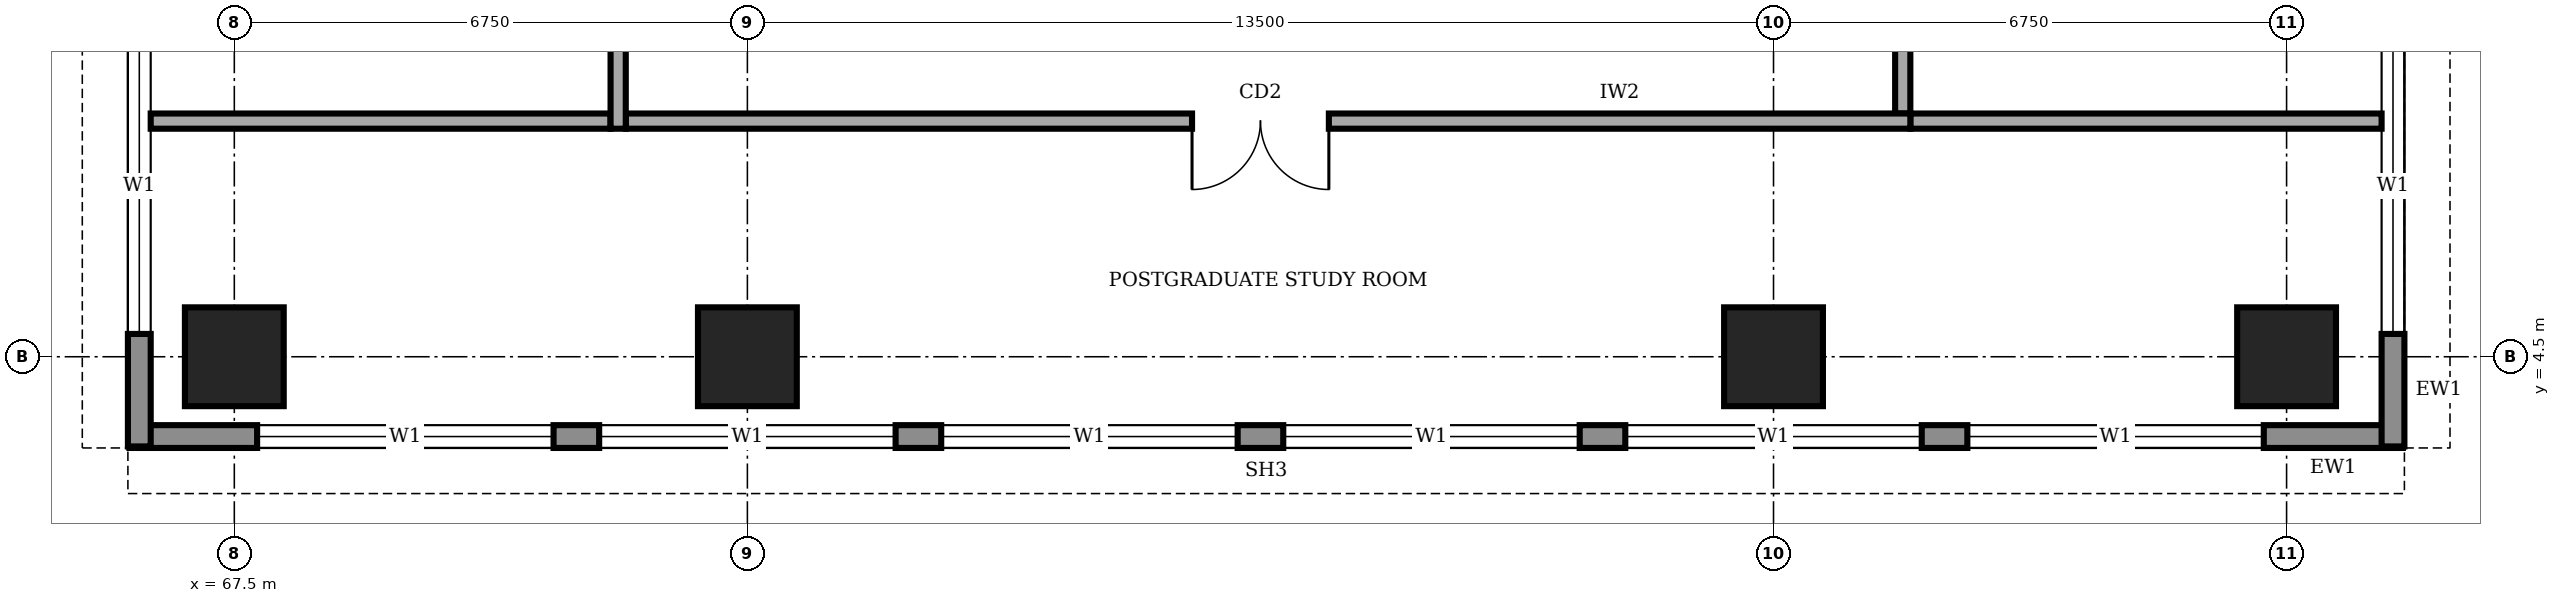
"""IFC4 building model, lengths in metres.
Left out: names, types, materials, properties, quantities, classifications, styles, units other than length and angle.
Written with IfcOpenShell. Run it as: python <this file> out.ifc"""

import sys

from ifc_helpers import new_model, si_unit, direction, frame, frame_2d, origin, origin_2d, place, context, subcontext, project, spatial, rectangle, extrude, element, fill, save


model = new_model("IFC4")
c1 = context("Model", 3, precision=1e-05, world=origin(), true_north=direction((0.0, 1.0)))
c2 = subcontext(c1, "Body", "Model", "MODEL_VIEW")
j1 = project(units=[si_unit("LENGTHUNIT", "METRE"), si_unit("PLANEANGLEUNIT", "RADIAN")], contexts=[c1])
p1 = place(None, origin())
s1 = spatial("IfcSite", under=j1, at=p1, CompositionType="ELEMENT")
p2 = place(p1, origin())
s2 = spatial("IfcBuilding", under=s1, at=p2, CompositionType="ELEMENT")
p3 = place(p2, frame((0.0, 0.0, 209.0)))
s3 = spatial("IfcBuildingStorey", under=s2, at=p3, CompositionType="ELEMENT", Elevation=209.0)
for number, where, z_axis, x_axis in (
    (1, (67.5, 4.5, 0.0), (0.0, 0.0, 1.0), (1.0, 0.0, 0.0)),
    (2, (74.25, 4.5, 0.0), (0.0, 0.0, 1.0), (1.0, 0.0, 0.0)),
    (3, (87.75, 4.5, 0.0), (0.0, 0.0, 1.0), (1.0, 0.0, 0.0)),
    (4, (94.5, 4.5, 0.0), (0.0, 0.0, 1.0), (1.0, 0.0, 0.0)),
):
    element("IfcColumn", number, at=place(p3, frame(where, z_axis=z_axis, x_axis=x_axis)), inside=s3, PredefinedType="COLUMN", context=c2, shape_type="SweptSolid", body=[
        extrude(rectangle(XDim=1.3, YDim=1.3, at=origin_2d()), origin(), (0.0, 0.0, 1.0), 4.0),
    ])
p4 = place(p3, frame((66.12, 3.45, 0.0), z_axis=(0.0, 0.0, 1.0), x_axis=(1.0, 0.0, 0.0)))
e5 = element("IfcWall", 5, at=p4, inside=s3, PredefinedType="STANDARD", context=c2, shape_type="SweptSolid", body=[
    extrude(rectangle(XDim=29.91, YDim=0.3, at=frame_2d((14.955, 0.0))), origin(), (0.0, 0.0, 1.0), 3.75),
])
p5 = place(p4, frame((1.68, 0.0, 0.9)))
e6 = element("IfcOpeningElement", 6, at=p5, cuts=e5, PredefinedType="OPENING", context=c2, shape_type="SweptSolid", body=[
    extrude(rectangle(XDim=3.9, YDim=2.2, at=frame_2d((1.95, 1.1))), frame((0.0, 0.16, 0.0), z_axis=(0.0, -1.0, 0.0), x_axis=(1.0, 0.0, 0.0)), (0.0, 0.0, 1.0), 0.32),
])
p6 = place(p4, frame((6.18, 0.0, 0.9)))
e7 = element("IfcOpeningElement", 7, at=p6, cuts=e5, PredefinedType="OPENING", context=c2, shape_type="SweptSolid", body=[
    extrude(rectangle(XDim=3.9, YDim=2.2, at=frame_2d((1.95, 1.1))), frame((0.0, 0.16, 0.0), z_axis=(0.0, -1.0, 0.0), x_axis=(1.0, 0.0, 0.0)), (0.0, 0.0, 1.0), 0.32),
])
p7 = place(p4, frame((10.68, 0.0, 0.9)))
e8 = element("IfcOpeningElement", 8, at=p7, cuts=e5, PredefinedType="OPENING", context=c2, shape_type="SweptSolid", body=[
    extrude(rectangle(XDim=3.9, YDim=2.2, at=frame_2d((1.95, 1.1))), frame((0.0, 0.16, 0.0), z_axis=(0.0, -1.0, 0.0), x_axis=(1.0, 0.0, 0.0)), (0.0, 0.0, 1.0), 0.32),
])
p8 = place(p4, frame((15.18, 0.0, 0.9)))
e9 = element("IfcOpeningElement", 9, at=p8, cuts=e5, PredefinedType="OPENING", context=c2, shape_type="SweptSolid", body=[
    extrude(rectangle(XDim=3.9, YDim=2.2, at=frame_2d((1.95, 1.1))), frame((0.0, 0.16, 0.0), z_axis=(0.0, -1.0, 0.0), x_axis=(1.0, 0.0, 0.0)), (0.0, 0.0, 1.0), 0.32),
])
p9 = place(p4, frame((19.68, 0.0, 0.9)))
e10 = element("IfcOpeningElement", 10, at=p9, cuts=e5, PredefinedType="OPENING", context=c2, shape_type="SweptSolid", body=[
    extrude(rectangle(XDim=3.9, YDim=2.2, at=frame_2d((1.95, 1.1))), frame((0.0, 0.16, 0.0), z_axis=(0.0, -1.0, 0.0), x_axis=(1.0, 0.0, 0.0)), (0.0, 0.0, 1.0), 0.32),
])
p10 = place(p4, frame((24.18, 0.0, 0.9)))
e11 = element("IfcOpeningElement", 11, at=p10, cuts=e5, PredefinedType="OPENING", context=c2, shape_type="SweptSolid", body=[
    extrude(rectangle(XDim=3.9, YDim=2.2, at=frame_2d((1.95, 1.1))), frame((0.0, 0.16, 0.0), z_axis=(0.0, -1.0, 0.0), x_axis=(1.0, 0.0, 0.0)), (0.0, 0.0, 1.0), 0.32),
])
p11 = place(p3, frame((95.9, 3.32, 0.0), z_axis=(0.0, 0.0, 1.0), x_axis=(0.0, 1.0, 0.0)))
e12 = element("IfcWall", 12, at=p11, inside=s3, PredefinedType="STANDARD", context=c2, shape_type="SweptSolid", body=[
    extrude(rectangle(XDim=33.86, YDim=0.3, at=frame_2d((16.93, 0.0))), origin(), (0.0, 0.0, 1.0), 3.75),
])
p12 = place(p11, frame((1.48, 0.0, 0.9)))
e13 = element("IfcOpeningElement", 13, at=p12, cuts=e12, PredefinedType="OPENING", context=c2, shape_type="SweptSolid", body=[
    extrude(rectangle(XDim=3.9, YDim=2.2, at=frame_2d((1.95, 1.1))), frame((0.0, 0.16, 0.0), z_axis=(0.0, -1.0, 0.0), x_axis=(1.0, 0.0, 0.0)), (0.0, 0.0, 1.0), 0.32),
])
p13 = place(p11, frame((5.98, 0.0, 0.9)))
e14 = element("IfcOpeningElement", 14, at=p13, cuts=e12, PredefinedType="OPENING", context=c2, shape_type="SweptSolid", body=[
    extrude(rectangle(XDim=3.9, YDim=2.2, at=frame_2d((1.95, 1.1))), frame((0.0, 0.16, 0.0), z_axis=(0.0, -1.0, 0.0), x_axis=(1.0, 0.0, 0.0)), (0.0, 0.0, 1.0), 0.32),
])
p14 = place(p11, frame((10.48, 0.0, 0.9)))
e15 = element("IfcOpeningElement", 15, at=p14, cuts=e12, PredefinedType="OPENING", context=c2, shape_type="SweptSolid", body=[
    extrude(rectangle(XDim=3.9, YDim=2.2, at=frame_2d((1.95, 1.1))), frame((0.0, 0.16, 0.0), z_axis=(0.0, -1.0, 0.0), x_axis=(1.0, 0.0, 0.0)), (0.0, 0.0, 1.0), 0.32),
])
p15 = place(p11, frame((14.98, 0.0, 0.9)))
e16 = element("IfcOpeningElement", 16, at=p15, cuts=e12, PredefinedType="OPENING", context=c2, shape_type="SweptSolid", body=[
    extrude(rectangle(XDim=3.9, YDim=2.2, at=frame_2d((1.95, 1.1))), frame((0.0, 0.16, 0.0), z_axis=(0.0, -1.0, 0.0), x_axis=(1.0, 0.0, 0.0)), (0.0, 0.0, 1.0), 0.32),
])
p16 = place(p11, frame((19.48, 0.0, 0.9)))
e17 = element("IfcOpeningElement", 17, at=p16, cuts=e12, PredefinedType="OPENING", context=c2, shape_type="SweptSolid", body=[
    extrude(rectangle(XDim=3.9, YDim=2.2, at=frame_2d((1.95, 1.1))), frame((0.0, 0.16, 0.0), z_axis=(0.0, -1.0, 0.0), x_axis=(1.0, 0.0, 0.0)), (0.0, 0.0, 1.0), 0.32),
])
p17 = place(p11, frame((23.98, 0.0, 0.9)))
e18 = element("IfcOpeningElement", 18, at=p17, cuts=e12, PredefinedType="OPENING", context=c2, shape_type="SweptSolid", body=[
    extrude(rectangle(XDim=3.9, YDim=2.2, at=frame_2d((1.95, 1.1))), frame((0.0, 0.16, 0.0), z_axis=(0.0, -1.0, 0.0), x_axis=(1.0, 0.0, 0.0)), (0.0, 0.0, 1.0), 0.32),
])
p18 = place(p11, frame((28.48, 0.0, 0.9)))
e19 = element("IfcOpeningElement", 19, at=p18, cuts=e12, PredefinedType="OPENING", context=c2, shape_type="SweptSolid", body=[
    extrude(rectangle(XDim=3.9, YDim=2.2, at=frame_2d((1.95, 1.1))), frame((0.0, 0.16, 0.0), z_axis=(0.0, -1.0, 0.0), x_axis=(1.0, 0.0, 0.0)), (0.0, 0.0, 1.0), 0.32),
])
p19 = place(p3, frame((66.25, 37.18, 0.0), z_axis=(0.0, 0.0, 1.0), x_axis=(0.0, -1.0, 0.0)))
e20 = element("IfcWall", 20, at=p19, inside=s3, PredefinedType="STANDARD", context=c2, shape_type="SweptSolid", body=[
    extrude(rectangle(XDim=33.86, YDim=0.3, at=frame_2d((16.93, 0.0))), origin(), (0.0, 0.0, 1.0), 3.75),
])
p20 = place(p19, frame((28.48, 0.0, 0.9)))
e21 = element("IfcOpeningElement", 21, at=p20, cuts=e20, PredefinedType="OPENING", context=c2, shape_type="SweptSolid", body=[
    extrude(rectangle(XDim=3.9, YDim=2.2, at=frame_2d((1.95, 1.1))), frame((0.0, 0.16, 0.0), z_axis=(0.0, -1.0, 0.0), x_axis=(1.0, 0.0, 0.0)), (0.0, 0.0, 1.0), 0.32),
])
p21 = place(p19, frame((23.98, 0.0, 0.9)))
e22 = element("IfcOpeningElement", 22, at=p21, cuts=e20, PredefinedType="OPENING", context=c2, shape_type="SweptSolid", body=[
    extrude(rectangle(XDim=3.9, YDim=2.2, at=frame_2d((1.95, 1.1))), frame((0.0, 0.16, 0.0), z_axis=(0.0, -1.0, 0.0), x_axis=(1.0, 0.0, 0.0)), (0.0, 0.0, 1.0), 0.32),
])
p22 = place(p19, frame((19.48, 0.0, 0.9)))
e23 = element("IfcOpeningElement", 23, at=p22, cuts=e20, PredefinedType="OPENING", context=c2, shape_type="SweptSolid", body=[
    extrude(rectangle(XDim=3.9, YDim=2.2, at=frame_2d((1.95, 1.1))), frame((0.0, 0.16, 0.0), z_axis=(0.0, -1.0, 0.0), x_axis=(1.0, 0.0, 0.0)), (0.0, 0.0, 1.0), 0.32),
])
p23 = place(p19, frame((14.98, 0.0, 0.9)))
e24 = element("IfcOpeningElement", 24, at=p23, cuts=e20, PredefinedType="OPENING", context=c2, shape_type="SweptSolid", body=[
    extrude(rectangle(XDim=3.9, YDim=2.2, at=frame_2d((1.95, 1.1))), frame((0.0, 0.16, 0.0), z_axis=(0.0, -1.0, 0.0), x_axis=(1.0, 0.0, 0.0)), (0.0, 0.0, 1.0), 0.32),
])
p24 = place(p19, frame((10.48, 0.0, 0.9)))
e25 = element("IfcOpeningElement", 25, at=p24, cuts=e20, PredefinedType="OPENING", context=c2, shape_type="SweptSolid", body=[
    extrude(rectangle(XDim=3.9, YDim=2.2, at=frame_2d((1.95, 1.1))), frame((0.0, 0.16, 0.0), z_axis=(0.0, -1.0, 0.0), x_axis=(1.0, 0.0, 0.0)), (0.0, 0.0, 1.0), 0.32),
])
p25 = place(p19, frame((5.98, 0.0, 0.9)))
e26 = element("IfcOpeningElement", 26, at=p25, cuts=e20, PredefinedType="OPENING", context=c2, shape_type="SweptSolid", body=[
    extrude(rectangle(XDim=3.9, YDim=2.2, at=frame_2d((1.95, 1.1))), frame((0.0, 0.16, 0.0), z_axis=(0.0, -1.0, 0.0), x_axis=(1.0, 0.0, 0.0)), (0.0, 0.0, 1.0), 0.32),
])
p26 = place(p19, frame((1.48, 0.0, 0.9)))
e27 = element("IfcOpeningElement", 27, at=p26, cuts=e20, PredefinedType="OPENING", context=c2, shape_type="SweptSolid", body=[
    extrude(rectangle(XDim=3.9, YDim=2.2, at=frame_2d((1.95, 1.1))), frame((0.0, 0.16, 0.0), z_axis=(0.0, -1.0, 0.0), x_axis=(1.0, 0.0, 0.0)), (0.0, 0.0, 1.0), 0.32),
])
p27 = place(p3, frame((72.65, 7.6, 0.0), z_axis=(0.0, 0.0, 1.0), x_axis=(1.0, 0.0, 0.0)))
e28 = element("IfcWall", 28, at=p27, inside=s3, PredefinedType="SOLIDWALL", context=c2, shape_type="SweptSolid", body=[
    extrude(rectangle(XDim=16.9, YDim=0.2, at=frame_2d((8.45, 0.0))), origin(), (0.0, 0.0, 1.0), 3.75),
])
p28 = place(p27, frame((7.45, 0.0, 0.0)))
e29 = element("IfcOpeningElement", 29, at=p28, cuts=e28, PredefinedType="OPENING", context=c2, shape_type="SweptSolid", body=[
    extrude(rectangle(XDim=1.8, YDim=2.1, at=frame_2d((0.9, 1.05))), frame((0.0, 0.11, 0.0), z_axis=(0.0, -1.0, 0.0), x_axis=(1.0, 0.0, 0.0)), (0.0, 0.0, 1.0), 0.22),
])
p29 = place(p3, frame((89.45, 7.7, 0.0), z_axis=(0.0, 0.0, 1.0), x_axis=(0.0, 1.0, 0.0)))
e30 = element("IfcWall", 30, at=p29, inside=s3, PredefinedType="SOLIDWALL", context=c2, shape_type="SweptSolid", body=[
    extrude(rectangle(XDim=23.8, YDim=0.2, at=frame_2d((11.9, 0.0))), origin(), (0.0, 0.0, 1.0), 3.75),
])
p30 = place(p29, frame((2.3, 0.0, 0.0)))
e31 = element("IfcOpeningElement", 31, at=p30, cuts=e30, PredefinedType="OPENING", context=c2, shape_type="SweptSolid", body=[
    extrude(rectangle(XDim=1.0, YDim=2.1, at=frame_2d((0.5, 1.05))), frame((0.0, 0.11, 0.0), z_axis=(0.0, -1.0, 0.0), x_axis=(1.0, 0.0, 0.0)), (0.0, 0.0, 1.0), 0.22),
])
p31 = place(p29, frame((7.05, 0.0, 0.0)))
e32 = element("IfcOpeningElement", 32, at=p31, cuts=e30, PredefinedType="OPENING", context=c2, shape_type="SweptSolid", body=[
    extrude(rectangle(XDim=0.9, YDim=2.1, at=frame_2d((0.45, 1.05))), frame((0.0, 0.11, 0.0), z_axis=(0.0, -1.0, 0.0), x_axis=(1.0, 0.0, 0.0)), (0.0, 0.0, 1.0), 0.22),
])
p32 = place(p29, frame((11.85, 0.0, 0.0)))
e33 = element("IfcOpeningElement", 33, at=p32, cuts=e30, PredefinedType="OPENING", context=c2, shape_type="SweptSolid", body=[
    extrude(rectangle(XDim=0.9, YDim=2.1, at=frame_2d((0.45, 1.05))), frame((0.0, 0.11, 0.0), z_axis=(0.0, -1.0, 0.0), x_axis=(1.0, 0.0, 0.0)), (0.0, 0.0, 1.0), 0.22),
])
p33 = place(p29, frame((14.9, 0.0, 0.0)))
e34 = element("IfcOpeningElement", 34, at=p33, cuts=e30, PredefinedType="OPENING", context=c2, shape_type="SweptSolid", body=[
    extrude(rectangle(XDim=0.9, YDim=2.1, at=frame_2d((0.45, 1.05))), frame((0.0, 0.11, 0.0), z_axis=(0.0, -1.0, 0.0), x_axis=(1.0, 0.0, 0.0)), (0.0, 0.0, 1.0), 0.22),
])
p34 = place(p29, frame((17.8, 0.0, 0.0)))
e35 = element("IfcOpeningElement", 35, at=p34, cuts=e30, PredefinedType="OPENING", context=c2, shape_type="SweptSolid", body=[
    extrude(rectangle(XDim=1.0, YDim=2.1, at=frame_2d((0.5, 1.05))), frame((0.0, 0.11, 0.0), z_axis=(0.0, -1.0, 0.0), x_axis=(1.0, 0.0, 0.0)), (0.0, 0.0, 1.0), 0.22),
])
p35 = place(p29, frame((9.7, 0.0, 0.0)))
e36 = element("IfcOpeningElement", 36, at=p35, cuts=e30, PredefinedType="OPENING", context=c2, shape_type="SweptSolid", body=[
    extrude(rectangle(XDim=1.0, YDim=2.1, at=frame_2d((0.5, 1.05))), frame((0.0, 0.11, 0.0), z_axis=(0.0, -1.0, 0.0), x_axis=(1.0, 0.0, 0.0)), (0.0, 0.0, 1.0), 0.22),
])
p36 = place(p29, frame((21.05, 0.0, 0.0)))
e37 = element("IfcOpeningElement", 37, at=p36, cuts=e30, PredefinedType="OPENING", context=c2, shape_type="SweptSolid", body=[
    extrude(rectangle(XDim=1.0, YDim=2.1, at=frame_2d((0.5, 1.05))), frame((0.0, 0.11, 0.0), z_axis=(0.0, -1.0, 0.0), x_axis=(1.0, 0.0, 0.0)), (0.0, 0.0, 1.0), 0.22),
])
p37 = place(p3, frame((72.55, 31.3, 0.0), z_axis=(0.0, 0.0, 1.0), x_axis=(0.0, -1.0, 0.0)))
e38 = element("IfcWall", 38, at=p37, inside=s3, PredefinedType="SOLIDWALL", context=c2, shape_type="SweptSolid", body=[
    extrude(rectangle(XDim=23.8, YDim=0.2, at=frame_2d((11.9, 0.0))), origin(), (0.0, 0.0, 1.0), 3.75),
])
p38 = place(p37, frame((18.05, 0.0, 0.0)))
e39 = element("IfcOpeningElement", 39, at=p38, cuts=e38, PredefinedType="OPENING", context=c2, shape_type="SweptSolid", body=[
    extrude(rectangle(XDim=1.0, YDim=2.1, at=frame_2d((0.5, 1.05))), frame((0.0, 0.11, 0.0), z_axis=(0.0, -1.0, 0.0), x_axis=(1.0, 0.0, 0.0)), (0.0, 0.0, 1.0), 0.22),
])
p39 = place(p37, frame((6.05, 0.0, 0.0)))
e40 = element("IfcOpeningElement", 40, at=p39, cuts=e38, PredefinedType="OPENING", context=c2, shape_type="SweptSolid", body=[
    extrude(rectangle(XDim=1.0, YDim=2.1, at=frame_2d((0.5, 1.05))), frame((0.0, 0.11, 0.0), z_axis=(0.0, -1.0, 0.0), x_axis=(1.0, 0.0, 0.0)), (0.0, 0.0, 1.0), 0.22),
])
p40 = place(p3, frame((66.4, 7.6, 0.0), z_axis=(0.0, 0.0, 1.0), x_axis=(1.0, 0.0, 0.0)))
e41 = element("IfcWall", 41, at=p40, inside=s3, PredefinedType="SOLIDWALL", context=c2, shape_type="SweptSolid", body=[
    extrude(rectangle(XDim=6.05, YDim=0.2, at=frame_2d((3.025, 0.0))), origin(), (0.0, 0.0, 1.0), 3.75),
])
p41 = place(p3, frame((89.55, 7.6, 0.0), z_axis=(0.0, 0.0, 1.0), x_axis=(1.0, 0.0, 0.0)))
e42 = element("IfcWall", 42, at=p41, inside=s3, PredefinedType="SOLIDWALL", context=c2, shape_type="SweptSolid", body=[
    extrude(rectangle(XDim=6.2, YDim=0.2, at=frame_2d((3.1, 0.0))), origin(), (0.0, 0.0, 1.0), 3.75),
])
p42 = place(p5, origin())
e43 = element("IfcWindow", 43, at=p42, inside=s3, PartitioningType="SINGLE_PANEL", PredefinedType="WINDOW", context=c2, shape_type="SweptSolid", body=[
    extrude(rectangle(XDim=3.9, YDim=2.2, at=frame_2d((1.95, 1.1))), frame((0.0, 0.03, 0.0), z_axis=(0.0, -1.0, 0.0), x_axis=(1.0, 0.0, 0.0)), (0.0, 0.0, 1.0), 0.06),
])
fill(e6, e43)
p43 = place(p6, origin())
e44 = element("IfcWindow", 44, at=p43, inside=s3, PartitioningType="SINGLE_PANEL", PredefinedType="WINDOW", context=c2, shape_type="SweptSolid", body=[
    extrude(rectangle(XDim=3.9, YDim=2.2, at=frame_2d((1.95, 1.1))), frame((0.0, 0.03, 0.0), z_axis=(0.0, -1.0, 0.0), x_axis=(1.0, 0.0, 0.0)), (0.0, 0.0, 1.0), 0.06),
])
fill(e7, e44)
p44 = place(p7, origin())
e45 = element("IfcWindow", 45, at=p44, inside=s3, PartitioningType="SINGLE_PANEL", PredefinedType="WINDOW", context=c2, shape_type="SweptSolid", body=[
    extrude(rectangle(XDim=3.9, YDim=2.2, at=frame_2d((1.95, 1.1))), frame((0.0, 0.03, 0.0), z_axis=(0.0, -1.0, 0.0), x_axis=(1.0, 0.0, 0.0)), (0.0, 0.0, 1.0), 0.06),
])
fill(e8, e45)
p45 = place(p8, origin())
e46 = element("IfcWindow", 46, at=p45, inside=s3, PartitioningType="SINGLE_PANEL", PredefinedType="WINDOW", context=c2, shape_type="SweptSolid", body=[
    extrude(rectangle(XDim=3.9, YDim=2.2, at=frame_2d((1.95, 1.1))), frame((0.0, 0.03, 0.0), z_axis=(0.0, -1.0, 0.0), x_axis=(1.0, 0.0, 0.0)), (0.0, 0.0, 1.0), 0.06),
])
fill(e9, e46)
p46 = place(p9, origin())
e47 = element("IfcWindow", 47, at=p46, inside=s3, PartitioningType="SINGLE_PANEL", PredefinedType="WINDOW", context=c2, shape_type="SweptSolid", body=[
    extrude(rectangle(XDim=3.9, YDim=2.2, at=frame_2d((1.95, 1.1))), frame((0.0, 0.03, 0.0), z_axis=(0.0, -1.0, 0.0), x_axis=(1.0, 0.0, 0.0)), (0.0, 0.0, 1.0), 0.06),
])
fill(e10, e47)
p47 = place(p10, origin())
e48 = element("IfcWindow", 48, at=p47, inside=s3, PartitioningType="SINGLE_PANEL", PredefinedType="WINDOW", context=c2, shape_type="SweptSolid", body=[
    extrude(rectangle(XDim=3.9, YDim=2.2, at=frame_2d((1.95, 1.1))), frame((0.0, 0.03, 0.0), z_axis=(0.0, -1.0, 0.0), x_axis=(1.0, 0.0, 0.0)), (0.0, 0.0, 1.0), 0.06),
])
fill(e11, e48)
p48 = place(p12, origin())
e49 = element("IfcWindow", 49, at=p48, inside=s3, PartitioningType="SINGLE_PANEL", PredefinedType="WINDOW", context=c2, shape_type="SweptSolid", body=[
    extrude(rectangle(XDim=3.9, YDim=2.2, at=frame_2d((1.95, 1.1))), frame((0.0, 0.03, 0.0), z_axis=(0.0, -1.0, 0.0), x_axis=(1.0, 0.0, 0.0)), (0.0, 0.0, 1.0), 0.06),
])
fill(e13, e49)
p49 = place(p20, origin())
e50 = element("IfcWindow", 50, at=p49, inside=s3, PartitioningType="SINGLE_PANEL", PredefinedType="WINDOW", context=c2, shape_type="SweptSolid", body=[
    extrude(rectangle(XDim=3.9, YDim=2.2, at=frame_2d((1.95, 1.1))), frame((0.0, 0.03, 0.0), z_axis=(0.0, -1.0, 0.0), x_axis=(1.0, 0.0, 0.0)), (0.0, 0.0, 1.0), 0.06),
])
fill(e21, e50)
p50 = place(p28, frame((1.8, 0.0, 0.0), z_axis=(0.0, 0.0, 1.0), x_axis=(-1.0, 0.0, 0.0)))
e51 = element("IfcDoor", 51, at=p50, inside=s3, OperationType="DOUBLE_DOOR_SINGLE_SWING", PredefinedType="DOOR", context=c2, shape_type="SweptSolid", body=[
    extrude(rectangle(XDim=1.8, YDim=2.1, at=frame_2d((0.9, 1.05))), frame((0.0, 0.025, 0.0), z_axis=(0.0, -1.0, 0.0), x_axis=(1.0, 0.0, 0.0)), (0.0, 0.0, 1.0), 0.05),
])
fill(e29, e51)
save(model, sys.argv[1])
